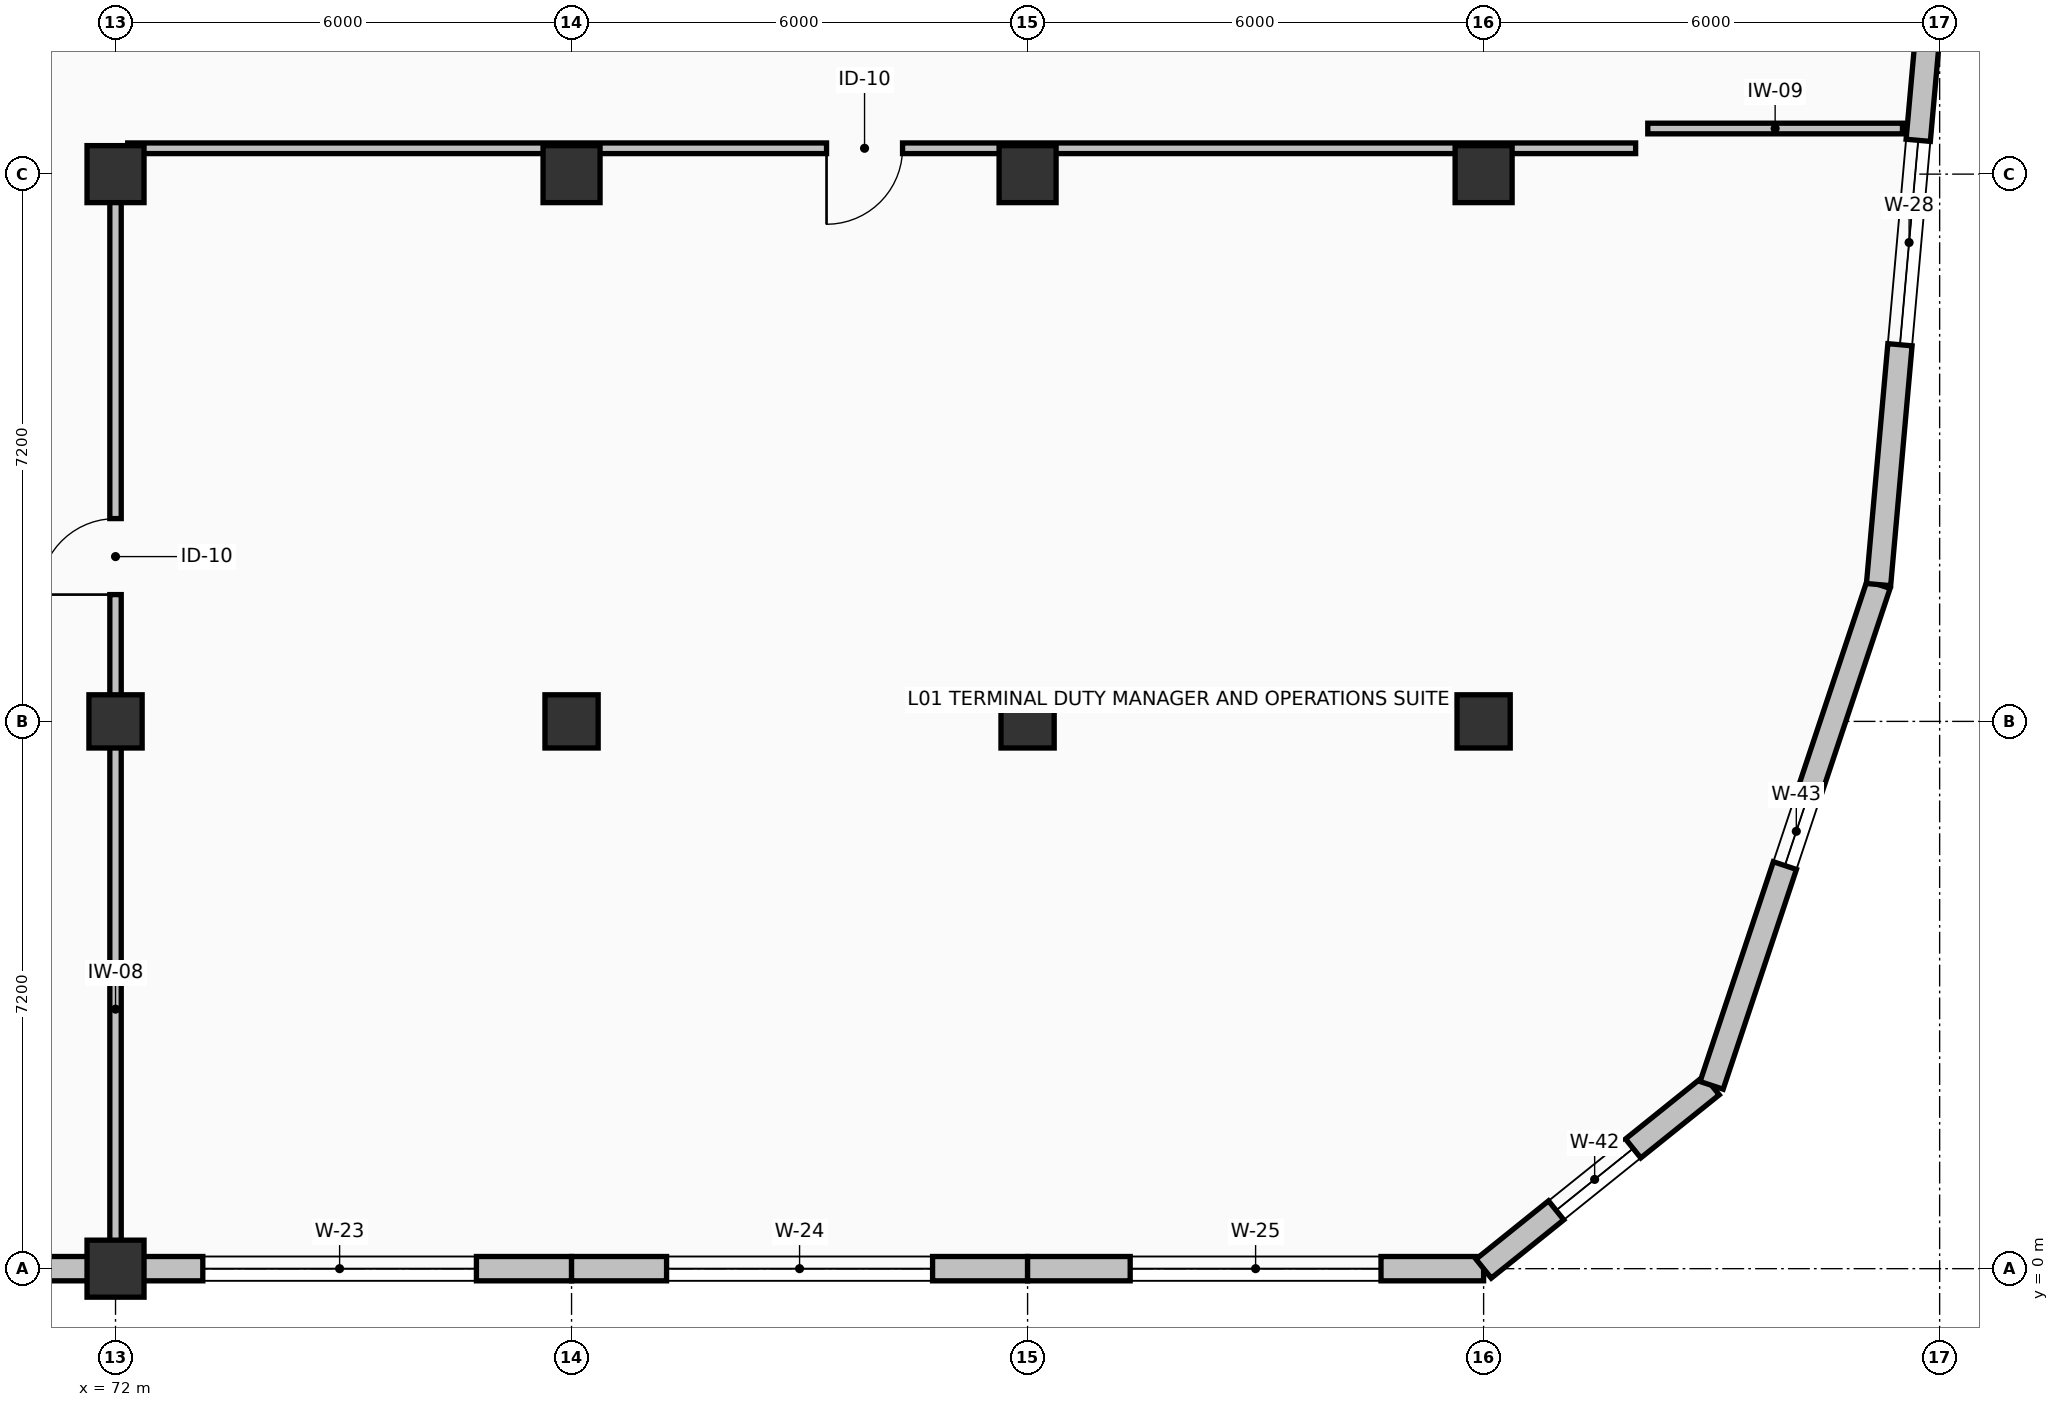
"""IFC4 building model, lengths in metres.
Left out: names, types, materials, properties, quantities, classifications, styles, units other than length and angle.
Written with IfcOpenShell. Run it as: python <this file> out.ifc"""

import sys

from ifc_helpers import new_model, si_unit, direction, frame, frame_2d, origin, origin_2d, place, context, subcontext, project, spatial, rectangle, extrude, element, fill, save


model = new_model("IFC4")
c1 = context("Model", 3, precision=1e-05, world=origin(), true_north=direction((0.0, 1.0)))
c2 = subcontext(c1, "Body", "Model", "MODEL_VIEW")
j1 = project(units=[si_unit("LENGTHUNIT", "METRE"), si_unit("PLANEANGLEUNIT", "RADIAN")], contexts=[c1])
p1 = place(None, origin())
s1 = spatial("IfcSite", under=j1, at=p1, CompositionType="ELEMENT")
p2 = place(p1, origin())
s2 = spatial("IfcBuilding", under=s1, at=p2, CompositionType="ELEMENT")
p3 = place(p2, frame((0.0, 0.0, 5.76)))
s3 = spatial("IfcBuildingStorey", under=s2, at=p3, CompositionType="ELEMENT", Elevation=5.76)
p4 = place(p3, frame((72.0, 0.0, 0.0), z_axis=(0.0, 0.0, 1.0), x_axis=(1.0, 0.0, 0.0)))
e1 = element("IfcColumn", 1, at=p4, inside=s3, PredefinedType="COLUMN", context=c2, shape_type="SweptSolid", body=[
    extrude(rectangle(XDim=0.75, YDim=0.75, at=origin_2d()), origin(), (0.0, 0.0, 1.0), 4.08),
])
p5 = place(p3, frame((72.0, 7.2, 0.0), z_axis=(0.0, 0.0, 1.0), x_axis=(1.0, 0.0, 0.0)))
e2 = element("IfcColumn", 2, at=p5, inside=s3, PredefinedType="COLUMN", context=c2, shape_type="SweptSolid", body=[
    extrude(rectangle(XDim=0.7, YDim=0.7, at=origin_2d()), origin(), (0.0, 0.0, 1.0), 4.08),
])
p6 = place(p3, frame((72.0, 14.4, 0.0), z_axis=(0.0, 0.0, 1.0), x_axis=(1.0, 0.0, 0.0)))
e3 = element("IfcColumn", 3, at=p6, inside=s3, PredefinedType="COLUMN", context=c2, shape_type="SweptSolid", body=[
    extrude(rectangle(XDim=0.75, YDim=0.75, at=origin_2d()), origin(), (0.0, 0.0, 1.0), 4.08),
])
p7 = place(p3, frame((78.0, 7.2, 0.0), z_axis=(0.0, 0.0, 1.0), x_axis=(1.0, 0.0, 0.0)))
e4 = element("IfcColumn", 4, at=p7, inside=s3, PredefinedType="COLUMN", context=c2, shape_type="SweptSolid", body=[
    extrude(rectangle(XDim=0.7, YDim=0.7, at=origin_2d()), origin(), (0.0, 0.0, 1.0), 4.08),
])
p8 = place(p3, frame((78.0, 14.4, 0.0), z_axis=(0.0, 0.0, 1.0), x_axis=(1.0, 0.0, 0.0)))
e5 = element("IfcColumn", 5, at=p8, inside=s3, PredefinedType="COLUMN", context=c2, shape_type="SweptSolid", body=[
    extrude(rectangle(XDim=0.75, YDim=0.75, at=origin_2d()), origin(), (0.0, 0.0, 1.0), 4.08),
])
p9 = place(p3, frame((84.0, 7.2, 0.0), z_axis=(0.0, 0.0, 1.0), x_axis=(1.0, 0.0, 0.0)))
e6 = element("IfcColumn", 6, at=p9, inside=s3, PredefinedType="COLUMN", context=c2, shape_type="SweptSolid", body=[
    extrude(rectangle(XDim=0.7, YDim=0.7, at=origin_2d()), origin(), (0.0, 0.0, 1.0), 4.08),
])
p10 = place(p3, frame((84.0, 14.4, 0.0), z_axis=(0.0, 0.0, 1.0), x_axis=(1.0, 0.0, 0.0)))
e7 = element("IfcColumn", 7, at=p10, inside=s3, PredefinedType="COLUMN", context=c2, shape_type="SweptSolid", body=[
    extrude(rectangle(XDim=0.75, YDim=0.75, at=origin_2d()), origin(), (0.0, 0.0, 1.0), 4.08),
])
p11 = place(p3, frame((90.0, 7.2, 0.0), z_axis=(0.0, 0.0, 1.0), x_axis=(1.0, 0.0, 0.0)))
e8 = element("IfcColumn", 8, at=p11, inside=s3, PredefinedType="COLUMN", context=c2, shape_type="SweptSolid", body=[
    extrude(rectangle(XDim=0.7, YDim=0.7, at=origin_2d()), origin(), (0.0, 0.0, 1.0), 4.08),
])
p12 = place(p3, frame((90.0, 14.4, 0.0), z_axis=(0.0, 0.0, 1.0), x_axis=(1.0, 0.0, 0.0)))
e9 = element("IfcColumn", 9, at=p12, inside=s3, PredefinedType="COLUMN", context=c2, shape_type="SweptSolid", body=[
    extrude(rectangle(XDim=0.75, YDim=0.75, at=origin_2d()), origin(), (0.0, 0.0, 1.0), 4.08),
])
p13 = place(p3, frame((66.0, 0.0, 0.0), z_axis=(0.0, 0.0, 1.0), x_axis=(1.0, 0.0, 0.0)))
e10 = element("IfcWall", 10, at=p13, inside=s3, PredefinedType="SOLIDWALL", context=c2, shape_type="SweptSolid", body=[
    extrude(rectangle(XDim=6.0, YDim=0.32, at=frame_2d((3.0, 0.0))), origin(), (0.0, 0.0, 1.0), 3.11),
])
p14 = place(p3, frame((72.0, 0.0, 0.0), z_axis=(0.0, 0.0, 1.0), x_axis=(1.0, 0.0, 0.0)))
e11 = element("IfcWall", 11, at=p14, inside=s3, PredefinedType="SOLIDWALL", context=c2, shape_type="SweptSolid", body=[
    extrude(rectangle(XDim=6.0, YDim=0.32, at=frame_2d((3.0, 0.0))), origin(), (0.0, 0.0, 1.0), 3.78),
])
p15 = place(p14, frame((1.148, 0.0, 0.95)))
e12 = element("IfcOpeningElement", 12, at=p15, cuts=e11, PredefinedType="OPENING", context=c2, shape_type="SweptSolid", body=[
    extrude(rectangle(XDim=3.6, YDim=1.5, at=frame_2d((1.8, 0.75))), frame((0.0, 0.17, 0.0), z_axis=(0.0, -1.0, 0.0), x_axis=(1.0, 0.0, 0.0)), (0.0, 0.0, 1.0), 0.34),
])
p16 = place(p3, frame((78.0, 0.0, 0.0), z_axis=(0.0, 0.0, 1.0), x_axis=(1.0, 0.0, 0.0)))
e13 = element("IfcWall", 13, at=p16, inside=s3, PredefinedType="SOLIDWALL", context=c2, shape_type="SweptSolid", body=[
    extrude(rectangle(XDim=6.0, YDim=0.32, at=frame_2d((3.0, 0.0))), origin(), (0.0, 0.0, 1.0), 3.78),
])
p17 = place(p16, frame((1.25, 0.0, 0.95)))
e14 = element("IfcOpeningElement", 14, at=p17, cuts=e13, PredefinedType="OPENING", context=c2, shape_type="SweptSolid", body=[
    extrude(rectangle(XDim=3.5, YDim=1.45, at=frame_2d((1.75, 0.725))), frame((0.0, 0.17, 0.0), z_axis=(0.0, -1.0, 0.0), x_axis=(1.0, 0.0, 0.0)), (0.0, 0.0, 1.0), 0.34),
])
p18 = place(p3, frame((84.0, 0.0, 0.0), z_axis=(0.0, 0.0, 1.0), x_axis=(1.0, 0.0, 0.0)))
e15 = element("IfcWall", 15, at=p18, inside=s3, PredefinedType="SOLIDWALL", context=c2, shape_type="SweptSolid", body=[
    extrude(rectangle(XDim=6.0, YDim=0.32, at=frame_2d((3.0, 0.0))), origin(), (0.0, 0.0, 1.0), 3.78),
])
p19 = place(p18, frame((1.35, 0.0, 0.95)))
e16 = element("IfcOpeningElement", 16, at=p19, cuts=e15, PredefinedType="OPENING", context=c2, shape_type="SweptSolid", body=[
    extrude(rectangle(XDim=3.3, YDim=1.45, at=frame_2d((1.65, 0.725))), frame((0.0, 0.17, 0.0), z_axis=(0.0, -1.0, 0.0), x_axis=(1.0, 0.0, 0.0)), (0.0, 0.0, 1.0), 0.34),
])
p20 = place(p3, frame((90.0, 0.0, 0.0), z_axis=(0.0, 0.0, 1.0), x_axis=(0.779393889884, 0.626534248395, 0.0)))
e17 = element("IfcWall", 17, at=p20, inside=s3, PredefinedType="SOLIDWALL", context=c2, shape_type="SweptSolid", body=[
    extrude(rectangle(XDim=3.849, YDim=0.32, at=frame_2d((1.925, 0.0))), origin(), (0.0, 0.0, 1.0), 3.78),
])
p21 = place(p20, frame((1.224, 0.0, 1.15)))
e18 = element("IfcOpeningElement", 18, at=p21, cuts=e17, PredefinedType="OPENING", context=c2, shape_type="SweptSolid", body=[
    extrude(rectangle(XDim=1.3, YDim=1.3, at=frame_2d((0.65, 0.65))), frame((0.0, 0.17, 0.0), z_axis=(0.0, -1.0, 0.0), x_axis=(1.0, 0.0, 0.0)), (0.0, 0.0, 1.0), 0.34),
])
p22 = place(p3, frame((93.0, 2.412, 0.0), z_axis=(0.0, 0.0, 1.0), x_axis=(0.31624885857, 0.948676266939, 0.0)))
e19 = element("IfcWall", 19, at=p22, inside=s3, PredefinedType="SOLIDWALL", context=c2, shape_type="SweptSolid", body=[
    extrude(rectangle(XDim=6.945, YDim=0.32, at=frame_2d((3.472, 0.0))), origin(), (0.0, 0.0, 1.0), 3.78),
])
p23 = place(p22, frame((3.048, 0.0, 1.15)))
e20 = element("IfcOpeningElement", 20, at=p23, cuts=e19, PredefinedType="OPENING", context=c2, shape_type="SweptSolid", body=[
    extrude(rectangle(XDim=0.95, YDim=0.95, at=frame_2d((0.475, 0.475))), frame((0.0, 0.17, 0.0), z_axis=(0.0, -1.0, 0.0), x_axis=(1.0, 0.0, 0.0)), (0.0, 0.0, 1.0), 0.34),
])
p24 = place(p3, frame((95.196, 9.0, 0.0), z_axis=(0.0, 0.0, 1.0), x_axis=(0.088947255406, 0.996036337568, 0.0)))
e21 = element("IfcWall", 21, at=p24, inside=s3, PredefinedType="SOLIDWALL", context=c2, shape_type="SweptSolid", body=[
    extrude(rectangle(XDim=9.036, YDim=0.32, at=frame_2d((4.518, 0.0))), origin(), (0.0, 0.0, 1.0), 3.78),
])
p25 = place(p24, frame((3.168, 0.0, 0.95)))
e22 = element("IfcOpeningElement", 22, at=p25, cuts=e21, PredefinedType="OPENING", context=c2, shape_type="SweptSolid", body=[
    extrude(rectangle(XDim=2.7, YDim=1.35, at=frame_2d((1.35, 0.675))), frame((0.0, 0.17, 0.0), z_axis=(0.0, -1.0, 0.0), x_axis=(1.0, 0.0, 0.0)), (0.0, 0.0, 1.0), 0.34),
])
p26 = place(p3, frame((72.0, 0.22, 0.0), z_axis=(0.0, 0.0, 1.0), x_axis=(0.0, 1.0, 0.0)))
e23 = element("IfcWall", 23, at=p26, inside=s3, PredefinedType="PARTITIONING", context=c2, shape_type="SweptSolid", body=[
    extrude(rectangle(XDim=14.52, YDim=0.15, at=frame_2d((7.26, 0.0))), origin(), (0.0, 0.0, 1.0), 2.86),
])
p27 = place(p26, frame((8.648, 0.0, 0.0)))
e24 = element("IfcOpeningElement", 24, at=p27, cuts=e23, PredefinedType="OPENING", context=c2, shape_type="SweptSolid", body=[
    extrude(rectangle(XDim=1.0, YDim=2.12, at=frame_2d((0.5, 1.06))), frame((0.0, 0.085, 0.0), z_axis=(0.0, -1.0, 0.0), x_axis=(1.0, 0.0, 0.0)), (0.0, 0.0, 1.0), 0.17),
])
p28 = place(p3, frame((95.511, 15.0, 0.0), z_axis=(0.0, 0.0, 1.0), x_axis=(-1.0, 0.0, 0.0)))
e25 = element("IfcWall", 25, at=p28, inside=s3, PredefinedType="PARTITIONING", context=c2, shape_type="SweptSolid", body=[
    extrude(rectangle(XDim=3.351, YDim=0.14, at=frame_2d((1.676, 0.0))), origin(), (0.0, 0.0, 1.0), 3.44),
])
p29 = place(p3, frame((92.0, 14.74, 0.0), z_axis=(0.0, 0.0, 1.0), x_axis=(-1.0, 0.0, 0.0)))
e26 = element("IfcWall", 26, at=p29, inside=s3, PredefinedType="PARTITIONING", context=c2, shape_type="SweptSolid", body=[
    extrude(rectangle(XDim=19.84, YDim=0.14, at=frame_2d((9.92, 0.0))), origin(), (0.0, 0.0, 1.0), 3.16),
])
p30 = place(p29, frame((9.645, 0.0, 0.0)))
e27 = element("IfcOpeningElement", 27, at=p30, cuts=e26, PredefinedType="OPENING", context=c2, shape_type="SweptSolid", body=[
    extrude(rectangle(XDim=1.0, YDim=2.12, at=frame_2d((0.5, 1.06))), frame((0.0, 0.08, 0.0), z_axis=(0.0, -1.0, 0.0), x_axis=(1.0, 0.0, 0.0)), (0.0, 0.0, 1.0), 0.16),
])
p31 = place(p15, origin())
e28 = element("IfcWindow", 28, at=p31, inside=s3, PartitioningType="SINGLE_PANEL", PredefinedType="WINDOW", context=c2, shape_type="SweptSolid", body=[
    extrude(rectangle(XDim=3.6, YDim=1.5, at=frame_2d((1.8, 0.75))), frame((0.0, 0.03, 0.0), z_axis=(0.0, -1.0, 0.0), x_axis=(1.0, 0.0, 0.0)), (0.0, 0.0, 1.0), 0.06),
])
fill(e12, e28)
p32 = place(p17, origin())
e29 = element("IfcWindow", 29, at=p32, inside=s3, PartitioningType="SINGLE_PANEL", PredefinedType="WINDOW", context=c2, shape_type="SweptSolid", body=[
    extrude(rectangle(XDim=3.5, YDim=1.45, at=frame_2d((1.75, 0.725))), frame((0.0, 0.03, 0.0), z_axis=(0.0, -1.0, 0.0), x_axis=(1.0, 0.0, 0.0)), (0.0, 0.0, 1.0), 0.06),
])
fill(e14, e29)
p33 = place(p19, origin())
e30 = element("IfcWindow", 30, at=p33, inside=s3, PartitioningType="SINGLE_PANEL", PredefinedType="WINDOW", context=c2, shape_type="SweptSolid", body=[
    extrude(rectangle(XDim=3.3, YDim=1.45, at=frame_2d((1.65, 0.725))), frame((0.0, 0.03, 0.0), z_axis=(0.0, -1.0, 0.0), x_axis=(1.0, 0.0, 0.0)), (0.0, 0.0, 1.0), 0.06),
])
fill(e16, e30)
p34 = place(p21, origin())
e31 = element("IfcWindow", 31, at=p34, inside=s3, PartitioningType="SINGLE_PANEL", PredefinedType="WINDOW", context=c2, shape_type="SweptSolid", body=[
    extrude(rectangle(XDim=1.3, YDim=1.3, at=frame_2d((0.65, 0.65))), frame((0.0, 0.03, 0.0), z_axis=(0.0, -1.0, 0.0), x_axis=(1.0, 0.0, 0.0)), (0.0, 0.0, 1.0), 0.06),
])
fill(e18, e31)
p35 = place(p23, origin())
e32 = element("IfcWindow", 32, at=p35, inside=s3, PartitioningType="SINGLE_PANEL", PredefinedType="WINDOW", context=c2, shape_type="SweptSolid", body=[
    extrude(rectangle(XDim=0.95, YDim=0.95, at=frame_2d((0.475, 0.475))), frame((0.0, 0.03, 0.0), z_axis=(0.0, -1.0, 0.0), x_axis=(1.0, 0.0, 0.0)), (0.0, 0.0, 1.0), 0.06),
])
fill(e20, e32)
p36 = place(p25, origin())
e33 = element("IfcWindow", 33, at=p36, inside=s3, PartitioningType="SINGLE_PANEL", PredefinedType="WINDOW", context=c2, shape_type="SweptSolid", body=[
    extrude(rectangle(XDim=2.7, YDim=1.35, at=frame_2d((1.35, 0.675))), frame((0.0, 0.03, 0.0), z_axis=(0.0, -1.0, 0.0), x_axis=(1.0, 0.0, 0.0)), (0.0, 0.0, 1.0), 0.06),
])
fill(e22, e33)
p37 = place(p27, origin())
e34 = element("IfcDoor", 34, at=p37, inside=s3, OperationType="SINGLE_SWING_LEFT", PredefinedType="DOOR", context=c2, shape_type="SweptSolid", body=[
    extrude(rectangle(XDim=1.0, YDim=2.12, at=frame_2d((0.5, 1.06))), frame((0.0, 0.025, 0.0), z_axis=(0.0, -1.0, 0.0), x_axis=(1.0, 0.0, 0.0)), (0.0, 0.0, 1.0), 0.05),
])
fill(e24, e34)
p38 = place(p30, origin())
e35 = element("IfcDoor", 35, at=p38, inside=s3, OperationType="SINGLE_SWING_RIGHT", PredefinedType="DOOR", context=c2, shape_type="SweptSolid", body=[
    extrude(rectangle(XDim=1.0, YDim=2.12, at=frame_2d((0.5, 1.06))), frame((0.0, 0.025, 0.0), z_axis=(0.0, -1.0, 0.0), x_axis=(1.0, 0.0, 0.0)), (0.0, 0.0, 1.0), 0.05),
])
fill(e27, e35)
save(model, sys.argv[1])
